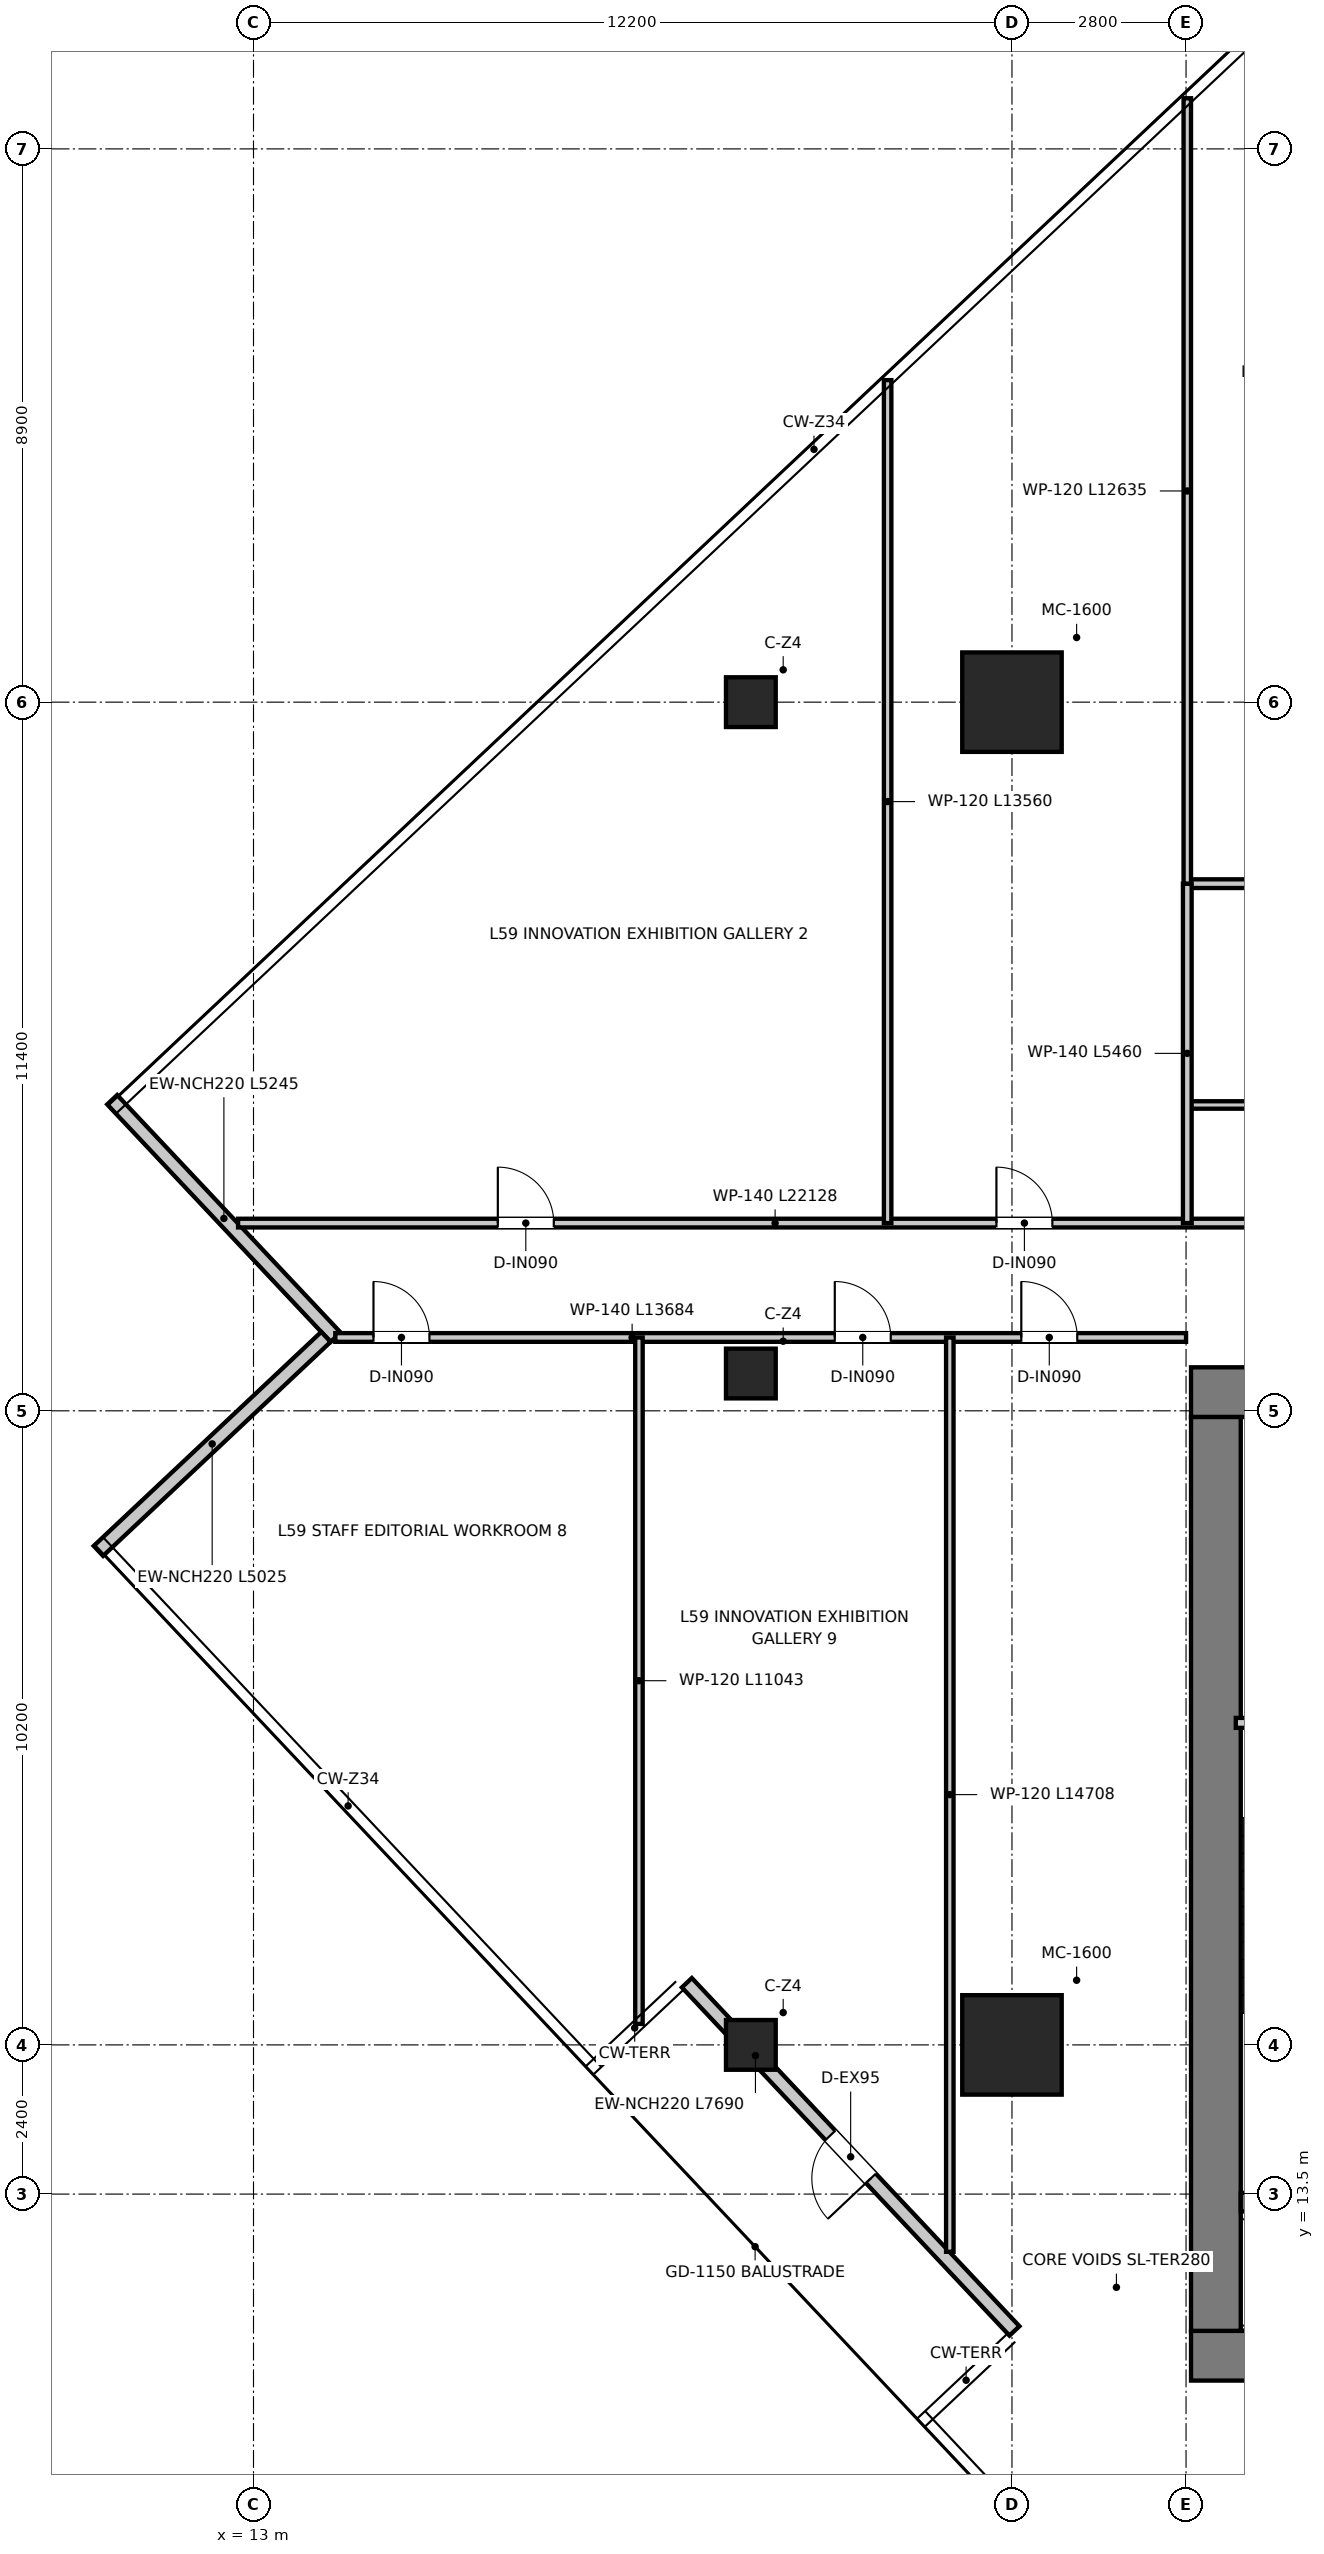
"""IFC4 building model, lengths in metres.
Left out: names, types, materials, properties, quantities, classifications, styles, units other than length and angle.
Written with IfcOpenShell. Run it as: python <this file> out.ifc"""

import sys

from ifc_helpers import new_model, si_unit, direction, frame, frame_2d, origin, origin_2d, place, context, subcontext, project, spatial, rectangle, extrude, source, transform, mapped, element, fill, save


model = new_model("IFC4")
c1 = context("Model", 3, precision=1e-05, world=origin(), true_north=direction((0.0, 1.0)))
c2 = subcontext(c1, "Body", "Model", "MODEL_VIEW")
j1 = project(units=[si_unit("LENGTHUNIT", "METRE"), si_unit("PLANEANGLEUNIT", "RADIAN")], contexts=[c1])
p1 = place(None, origin())
s1 = spatial("IfcSite", under=j1, at=p1, CompositionType="ELEMENT")
p2 = place(p1, origin())
s2 = spatial("IfcBuilding", under=s1, at=p2, CompositionType="ELEMENT")
p3 = place(p2, frame((0.0, 0.0, 242.85)))
s3 = spatial("IfcBuildingStorey", under=s2, at=p3, CompositionType="ELEMENT", Elevation=242.85)
p4 = place(p3, frame((28.08, 10.9, 0.0), z_axis=(0.0, 0.0, 1.0), x_axis=(1.0, 0.0, 0.0)))
e1 = element("IfcWall", 1, at=p4, inside=s3, PredefinedType="SHEAR", context=c2, shape_type="SweptSolid", body=[
    extrude(rectangle(XDim=15.84, YDim=0.8, at=frame_2d((7.92, 0.0))), origin(), (0.0, 0.0, 1.0), 3.95),
])
p5 = place(p3, frame((28.08, 26.4, 0.0), z_axis=(0.0, 0.0, 1.0), x_axis=(1.0, 0.0, 0.0)))
e2 = element("IfcWall", 2, at=p5, inside=s3, PredefinedType="SHEAR", context=c2, shape_type="SweptSolid", body=[
    extrude(rectangle(XDim=15.84, YDim=0.8, at=frame_2d((7.92, 0.0))), origin(), (0.0, 0.0, 1.0), 3.95),
])
p6 = place(p5, frame((7.22, 0.0, 0.0)))
e3 = element("IfcOpeningElement", 3, at=p6, cuts=e2, PredefinedType="OPENING", context=c2, shape_type="SweptSolid", body=[
    extrude(rectangle(XDim=1.4, YDim=2.2, at=frame_2d((0.7, 1.1))), frame((0.0, 0.41, 0.0), z_axis=(0.0, -1.0, 0.0), x_axis=(1.0, 0.0, 0.0)), (0.0, 0.0, 1.0), 0.82),
])
p7 = place(p5, frame((1.775, 0.0, 0.0)))
e4 = element("IfcOpeningElement", 4, at=p7, cuts=e2, PredefinedType="OPENING", context=c2, shape_type="SweptSolid", body=[
    extrude(rectangle(XDim=1.05, YDim=2.1, at=frame_2d((0.525, 1.05))), frame((0.0, 0.41, 0.0), z_axis=(0.0, -1.0, 0.0), x_axis=(1.0, 0.0, 0.0)), (0.0, 0.0, 1.0), 0.82),
])
p8 = place(p5, frame((13.015, 0.0, 0.0)))
e5 = element("IfcOpeningElement", 5, at=p8, cuts=e2, PredefinedType="OPENING", context=c2, shape_type="SweptSolid", body=[
    extrude(rectangle(XDim=1.05, YDim=2.1, at=frame_2d((0.525, 1.05))), frame((0.0, 0.41, 0.0), z_axis=(0.0, -1.0, 0.0), x_axis=(1.0, 0.0, 0.0)), (0.0, 0.0, 1.0), 0.82),
])
p9 = place(p3, frame((28.48, 11.3, 0.0), z_axis=(0.0, 0.0, 1.0), x_axis=(0.0, 1.0, 0.0)))
e6 = element("IfcWall", 6, at=p9, inside=s3, PredefinedType="SHEAR", context=c2, shape_type="SweptSolid", body=[
    extrude(rectangle(XDim=14.7, YDim=0.8, at=frame_2d((7.35, 0.0))), origin(), (0.0, 0.0, 1.0), 3.95),
])
p10 = place(p3, frame((28.88, 13.37, 0.0), z_axis=(0.0, 0.0, 1.0), x_axis=(1.0, 0.0, 0.0)))
e7 = element("IfcWall", 7, at=p10, inside=s3, PredefinedType="SHEAR", context=c2, shape_type="SweptSolid", body=[
    extrude(rectangle(XDim=3.1, YDim=0.3, at=frame_2d((1.55, 0.0))), origin(), (0.0, 0.0, 1.0), 3.95),
])
m1 = source(origin(), c2, "Body", "SweptSolid", [
    extrude(rectangle(XDim=1.6, YDim=1.6, at=origin_2d()), origin(), (0.0, 0.0, 1.0), 3.95),
])
for number, where, z_axis, x_axis in (
    (8, (25.2, 15.9, 0.0), (0.0, 0.0, 1.0), (1.0, 0.0, 0.0)),
    (9, (25.2, 37.5, 0.0), (0.0, 0.0, 1.0), (1.0, 0.0, 0.0)),
):
    element("IfcColumn", number, at=place(p3, frame(where, z_axis=z_axis, x_axis=x_axis)), inside=s3, PredefinedType="USERDEFINED", context=c2, shape_type="MappedRepresentation", body=[
        mapped(m1, transform((0.0, 0.0, 0.0), x_axis=(1.0, 0.0, 0.0), y_axis=(0.0, 1.0, 0.0), z_axis=(0.0, 0.0, 1.0), scale=1.0)),
    ])
m2 = source(origin(), c2, "Body", "SweptSolid", [
    extrude(rectangle(XDim=0.8, YDim=0.8, at=origin_2d()), origin(), (0.0, 0.0, 1.0), 3.95),
])
for number, where, z_axis, x_axis in (
    (10, (21.0, 15.9, 0.0), (0.0, 0.0, 1.0), (1.0, 0.0, 0.0)),
    (11, (21.0, 26.7, 0.0), (0.0, 0.0, 1.0), (1.0, 0.0, 0.0)),
    (12, (21.0, 37.5, 0.0), (0.0, 0.0, 1.0), (1.0, 0.0, 0.0)),
):
    element("IfcColumn", number, at=place(p3, frame(where, z_axis=z_axis, x_axis=x_axis)), inside=s3, PredefinedType="COLUMN", context=c2, shape_type="MappedRepresentation", body=[
        mapped(m2, transform((0.0, 0.0, 0.0), x_axis=(1.0, 0.0, 0.0), y_axis=(0.0, 1.0, 0.0), z_axis=(0.0, 0.0, 1.0), scale=1.0)),
    ])
p11 = place(p3, frame((10.727, 31.105, 0.0), z_axis=(0.0, 0.0, 1.0), x_axis=(0.685178828418, -0.728374884992, 0.0)))
e13 = element("IfcWall", 13, at=p11, inside=s3, PredefinedType="ELEMENTEDWALL", context=c2, shape_type="SweptSolid", body=[
    extrude(rectangle(XDim=5.245, YDim=0.22, at=frame_2d((2.623, 0.0))), origin(), (0.0, 0.0, 1.0), 3.67),
])
p12 = place(p3, frame((14.165, 27.289, 0.0), z_axis=(0.0, 0.0, 1.0), x_axis=(-0.728372554527, -0.685181305796, 0.0)))
e14 = element("IfcWall", 14, at=p12, inside=s3, PredefinedType="ELEMENTEDWALL", context=c2, shape_type="SweptSolid", body=[
    extrude(rectangle(XDim=5.025, YDim=0.22, at=frame_2d((2.513, 0.0))), origin(), (0.0, 0.0, 1.0), 3.67),
])
p13 = place(p3, frame((25.24, 11.299, 0.0), z_axis=(0.0, 0.0, 1.0), x_axis=(-0.685172559646, 0.728380781946, 0.0)))
e15 = element("IfcWall", 15, at=p13, inside=s3, PredefinedType="ELEMENTEDWALL", context=c2, shape_type="SweptSolid", body=[
    extrude(rectangle(XDim=7.69, YDim=0.22, at=frame_2d((3.845, 0.0))), origin(), (0.0, 0.0, 1.0), 3.18),
])
p14 = place(p13, frame((3.37, 0.0, 0.0)))
e16 = element("IfcOpeningElement", 16, at=p14, cuts=e15, PredefinedType="OPENING", context=c2, shape_type="SweptSolid", body=[
    extrude(rectangle(XDim=0.95, YDim=2.1, at=frame_2d((0.475, 1.05))), frame((0.0, 0.12, 0.0), z_axis=(0.0, -1.0, 0.0), x_axis=(1.0, 0.0, 0.0)), (0.0, 0.0, 1.0), 0.24),
])
p15 = place(p3, frame((28.8, 21.08, 0.0), z_axis=(0.0, 0.0, 1.0), x_axis=(1.0, 0.0, 0.0)))
e17 = element("IfcWall", 17, at=p15, inside=s3, PredefinedType="PARTITIONING", context=c2, shape_type="SweptSolid", body=[
    extrude(rectangle(XDim=3.16, YDim=0.16, at=frame_2d((1.58, 0.0))), origin(), (0.0, 0.0, 1.0), 3.67),
])
p16 = place(p15, frame((1.055, 0.0, 0.0)))
e18 = element("IfcOpeningElement", 18, at=p16, cuts=e17, PredefinedType="OPENING", context=c2, shape_type="SweptSolid", body=[
    extrude(rectangle(XDim=1.05, YDim=2.1, at=frame_2d((0.525, 1.05))), frame((0.0, 0.09, 0.0), z_axis=(0.0, -1.0, 0.0), x_axis=(1.0, 0.0, 0.0)), (0.0, 0.0, 1.0), 0.18),
])
p17 = place(p3, frame((12.752, 29.12, 0.0), z_axis=(0.0, 0.0, 1.0), x_axis=(1.0, 0.0, 0.0)))
e19 = element("IfcWall", 19, at=p17, inside=s3, PredefinedType="PARTITIONING", context=c2, shape_type="SweptSolid", body=[
    extrude(rectangle(XDim=22.128, YDim=0.14, at=frame_2d((11.064, 0.0))), origin(), (0.0, 0.0, 1.0), 3.03),
])
p18 = place(p17, frame((18.198, 0.0, 0.0)))
e20 = element("IfcOpeningElement", 20, at=p18, cuts=e19, PredefinedType="OPENING", context=c2, shape_type="SweptSolid", body=[
    extrude(rectangle(XDim=0.9, YDim=2.1, at=frame_2d((0.45, 1.05))), frame((0.0, 0.08, 0.0), z_axis=(0.0, -1.0, 0.0), x_axis=(1.0, 0.0, 0.0)), (0.0, 0.0, 1.0), 0.16),
])
p19 = place(p17, frame((4.178, 0.0, 0.0)))
e21 = element("IfcOpeningElement", 21, at=p19, cuts=e19, PredefinedType="OPENING", context=c2, shape_type="SweptSolid", body=[
    extrude(rectangle(XDim=0.9, YDim=2.1, at=frame_2d((0.45, 1.05))), frame((0.0, 0.08, 0.0), z_axis=(0.0, -1.0, 0.0), x_axis=(1.0, 0.0, 0.0)), (0.0, 0.0, 1.0), 0.16),
])
p20 = place(p17, frame((12.198, 0.0, 0.0)))
e22 = element("IfcOpeningElement", 22, at=p20, cuts=e19, PredefinedType="OPENING", context=c2, shape_type="SweptSolid", body=[
    extrude(rectangle(XDim=0.9, YDim=2.1, at=frame_2d((0.45, 1.05))), frame((0.0, 0.08, 0.0), z_axis=(0.0, -1.0, 0.0), x_axis=(1.0, 0.0, 0.0)), (0.0, 0.0, 1.0), 0.16),
])
p21 = place(p3, frame((14.316, 27.28, 0.0), z_axis=(0.0, 0.0, 1.0), x_axis=(1.0, 0.0, 0.0)))
e23 = element("IfcWall", 23, at=p21, inside=s3, PredefinedType="PARTITIONING", context=c2, shape_type="SweptSolid", body=[
    extrude(rectangle(XDim=13.684, YDim=0.14, at=frame_2d((6.842, 0.0))), origin(), (0.0, 0.0, 1.0), 3.03),
])
p22 = place(p21, frame((0.614, 0.0, 0.0)))
e24 = element("IfcOpeningElement", 24, at=p22, cuts=e23, PredefinedType="OPENING", context=c2, shape_type="SweptSolid", body=[
    extrude(rectangle(XDim=0.9, YDim=2.1, at=frame_2d((0.45, 1.05))), frame((0.0, 0.08, 0.0), z_axis=(0.0, -1.0, 0.0), x_axis=(1.0, 0.0, 0.0)), (0.0, 0.0, 1.0), 0.16),
])
p23 = place(p21, frame((8.034, 0.0, 0.0)))
e25 = element("IfcOpeningElement", 25, at=p23, cuts=e23, PredefinedType="OPENING", context=c2, shape_type="SweptSolid", body=[
    extrude(rectangle(XDim=0.9, YDim=2.1, at=frame_2d((0.45, 1.05))), frame((0.0, 0.08, 0.0), z_axis=(0.0, -1.0, 0.0), x_axis=(1.0, 0.0, 0.0)), (0.0, 0.0, 1.0), 0.16),
])
p24 = place(p21, frame((11.034, 0.0, 0.0)))
e26 = element("IfcOpeningElement", 26, at=p24, cuts=e23, PredefinedType="OPENING", context=c2, shape_type="SweptSolid", body=[
    extrude(rectangle(XDim=0.9, YDim=2.1, at=frame_2d((0.45, 1.05))), frame((0.0, 0.08, 0.0), z_axis=(0.0, -1.0, 0.0), x_axis=(1.0, 0.0, 0.0)), (0.0, 0.0, 1.0), 0.16),
])
p25 = place(p3, frame((28.02, 31.02, 0.0), z_axis=(0.0, 0.0, 1.0), x_axis=(1.0, 0.0, 0.0)))
e27 = element("IfcWall", 27, at=p25, inside=s3, PredefinedType="PARTITIONING", context=c2, shape_type="SweptSolid", body=[
    extrude(rectangle(XDim=6.86, YDim=0.12, at=frame_2d((3.43, 0.0))), origin(), (0.0, 0.0, 1.0), 3.18),
])
p26 = place(p3, frame((28.02, 34.58, 0.0), z_axis=(0.0, 0.0, 1.0), x_axis=(1.0, 0.0, 0.0)))
e28 = element("IfcWall", 28, at=p26, inside=s3, PredefinedType="PARTITIONING", context=c2, shape_type="SweptSolid", body=[
    extrude(rectangle(XDim=6.86, YDim=0.14, at=frame_2d((3.43, 0.0))), origin(), (0.0, 0.0, 1.0), 3.18),
])
p27 = place(p3, frame((28.02, 29.12, 0.0), z_axis=(0.0, 0.0, 1.0), x_axis=(0.0, 1.0, 0.0)))
e29 = element("IfcWall", 29, at=p27, inside=s3, PredefinedType="PARTITIONING", context=c2, shape_type="SweptSolid", body=[
    extrude(rectangle(XDim=5.46, YDim=0.14, at=frame_2d((2.73, 0.0))), origin(), (0.0, 0.0, 1.0), 3.37),
])
p28 = place(p3, frame((23.2, 29.12, 0.0), z_axis=(0.0, 0.0, 1.0), x_axis=(0.0, 1.0, 0.0)))
e30 = element("IfcWall", 30, at=p28, inside=s3, PredefinedType="PARTITIONING", context=c2, shape_type="SweptSolid", body=[
    extrude(rectangle(XDim=13.56, YDim=0.12, at=frame_2d((6.78, 0.0))), origin(), (0.0, 0.0, 1.0), 3.18),
])
p29 = place(p3, frame((28.02, 34.58, 0.0), z_axis=(0.0, 0.0, 1.0), x_axis=(0.0, 1.0, 0.0)))
e31 = element("IfcWall", 31, at=p29, inside=s3, PredefinedType="PARTITIONING", context=c2, shape_type="SweptSolid", body=[
    extrude(rectangle(XDim=12.635, YDim=0.12, at=frame_2d((6.317, 0.0))), origin(), (0.0, 0.0, 1.0), 3.03),
])
p30 = place(p3, frame((19.2, 16.237, 0.0), z_axis=(0.0, 0.0, 1.0), x_axis=(0.0, 1.0, 0.0)))
e32 = element("IfcWall", 32, at=p30, inside=s3, PredefinedType="PARTITIONING", context=c2, shape_type="SweptSolid", body=[
    extrude(rectangle(XDim=11.043, YDim=0.12, at=frame_2d((5.521, 0.0))), origin(), (0.0, 0.0, 1.0), 3.67),
])
p31 = place(p3, frame((24.2, 12.572, 0.0), z_axis=(0.0, 0.0, 1.0), x_axis=(0.0, 1.0, 0.0)))
e33 = element("IfcWall", 33, at=p31, inside=s3, PredefinedType="PARTITIONING", context=c2, shape_type="SweptSolid", body=[
    extrude(rectangle(XDim=14.708, YDim=0.12, at=frame_2d((7.354, 0.0))), origin(), (0.0, 0.0, 1.0), 3.18),
])
p32 = place(p19, origin())
e34 = element("IfcDoor", 34, at=p32, inside=s3, OperationType="SINGLE_SWING_LEFT", PredefinedType="DOOR", context=c2, shape_type="SweptSolid", body=[
    extrude(rectangle(XDim=0.9, YDim=2.1, at=frame_2d((0.45, 1.05))), frame((0.0, 0.025, 0.0), z_axis=(0.0, -1.0, 0.0), x_axis=(1.0, 0.0, 0.0)), (0.0, 0.0, 1.0), 0.05),
])
fill(e21, e34)
p33 = place(p20, origin())
e35 = element("IfcDoor", 35, at=p33, inside=s3, OperationType="SINGLE_SWING_LEFT", PredefinedType="DOOR", context=c2, shape_type="SweptSolid", body=[
    extrude(rectangle(XDim=0.9, YDim=2.1, at=frame_2d((0.45, 1.05))), frame((0.0, 0.025, 0.0), z_axis=(0.0, -1.0, 0.0), x_axis=(1.0, 0.0, 0.0)), (0.0, 0.0, 1.0), 0.05),
])
fill(e22, e35)
p34 = place(p22, origin())
e36 = element("IfcDoor", 36, at=p34, inside=s3, OperationType="SINGLE_SWING_LEFT", PredefinedType="DOOR", context=c2, shape_type="SweptSolid", body=[
    extrude(rectangle(XDim=0.9, YDim=2.1, at=frame_2d((0.45, 1.05))), frame((0.0, 0.025, 0.0), z_axis=(0.0, -1.0, 0.0), x_axis=(1.0, 0.0, 0.0)), (0.0, 0.0, 1.0), 0.05),
])
fill(e24, e36)
p35 = place(p23, origin())
e37 = element("IfcDoor", 37, at=p35, inside=s3, OperationType="SINGLE_SWING_LEFT", PredefinedType="DOOR", context=c2, shape_type="SweptSolid", body=[
    extrude(rectangle(XDim=0.9, YDim=2.1, at=frame_2d((0.45, 1.05))), frame((0.0, 0.025, 0.0), z_axis=(0.0, -1.0, 0.0), x_axis=(1.0, 0.0, 0.0)), (0.0, 0.0, 1.0), 0.05),
])
fill(e25, e37)
p36 = place(p24, origin())
e38 = element("IfcDoor", 38, at=p36, inside=s3, OperationType="SINGLE_SWING_LEFT", PredefinedType="DOOR", context=c2, shape_type="SweptSolid", body=[
    extrude(rectangle(XDim=0.9, YDim=2.1, at=frame_2d((0.45, 1.05))), frame((0.0, 0.025, 0.0), z_axis=(0.0, -1.0, 0.0), x_axis=(1.0, 0.0, 0.0)), (0.0, 0.0, 1.0), 0.05),
])
fill(e26, e38)
p37 = place(p14, origin())
e39 = element("IfcDoor", 39, at=p37, inside=s3, OperationType="SINGLE_SWING_LEFT", PredefinedType="DOOR", context=c2, shape_type="SweptSolid", body=[
    extrude(rectangle(XDim=0.95, YDim=2.1, at=frame_2d((0.475, 1.05))), frame((0.0, 0.025, 0.0), z_axis=(0.0, -1.0, 0.0), x_axis=(1.0, 0.0, 0.0)), (0.0, 0.0, 1.0), 0.05),
])
fill(e16, e39)
save(model, sys.argv[1])
